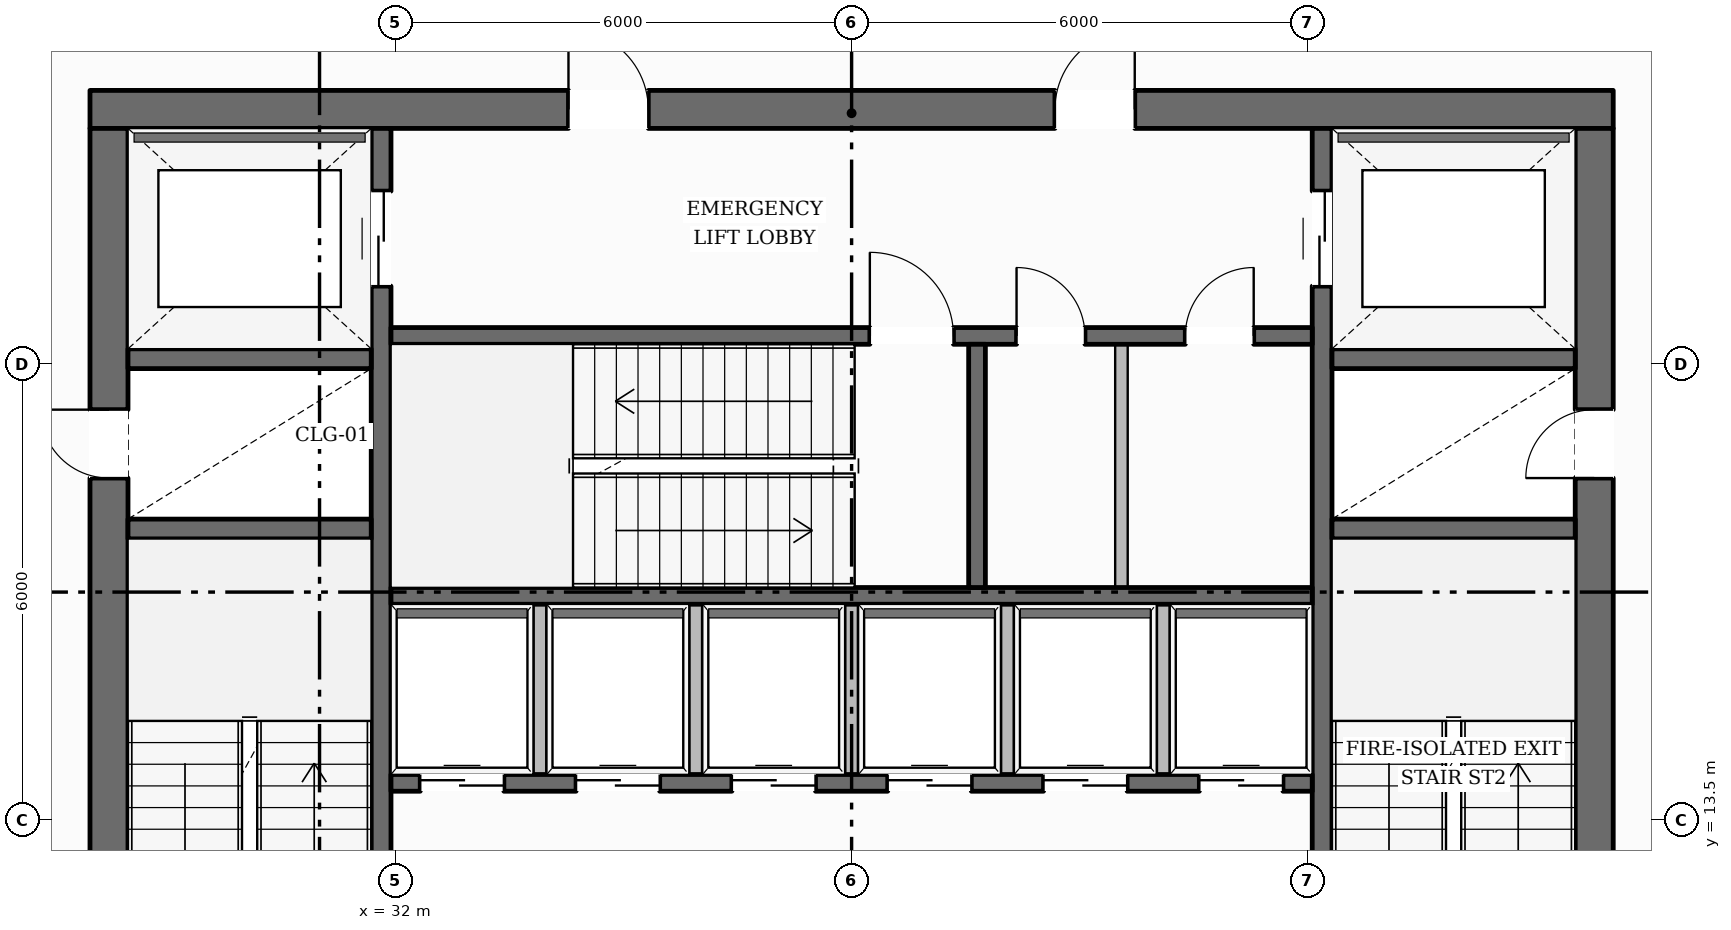
"""IFC4 building model, lengths in metres.
Left out: names, types, materials, properties, quantities, classifications, styles, units other than length and angle.
Written with IfcOpenShell. Run it as: python <this file> out.ifc"""

import sys

from ifc_helpers import new_model, si_unit, direction, frame, frame_2d, origin, place, context, subcontext, project, spatial, rectangle, extrude, element, fill, save


model = new_model("IFC4")
c1 = context("Model", 3, precision=1e-05, world=origin(), true_north=direction((0.0, 1.0)))
c2 = subcontext(c1, "Body", "Model", "MODEL_VIEW")
j1 = project(units=[si_unit("LENGTHUNIT", "METRE"), si_unit("PLANEANGLEUNIT", "RADIAN")], contexts=[c1])
p1 = place(None, origin())
s1 = spatial("IfcSite", under=j1, at=p1, CompositionType="ELEMENT")
p2 = place(p1, origin())
s2 = spatial("IfcBuilding", under=s1, at=p2, CompositionType="ELEMENT")
p3 = place(p2, frame((0.0, 0.0, 80.5)))
s3 = spatial("IfcBuildingStorey", under=s2, at=p3, CompositionType="ELEMENT", Elevation=80.5)
p4 = place(p3, frame((27.98, 22.85, 0.0), z_axis=(0.0, 0.0, 1.0), x_axis=(1.0, 0.0, 0.0)))
e1 = element("IfcWall", 1, at=p4, inside=s3, PredefinedType="SOLIDWALL", context=c2, shape_type="SweptSolid", body=[
    extrude(rectangle(XDim=20.04, YDim=0.5, at=frame_2d((10.02, 0.0))), origin(), (0.0, 0.0, 1.0), 4.75),
])
p5 = place(p4, frame((6.295, 0.0, 0.0)))
e2 = element("IfcOpeningElement", 2, at=p5, cuts=e1, PredefinedType="OPENING", context=c2, shape_type="SweptSolid", body=[
    extrude(rectangle(XDim=1.05, YDim=2.15, at=frame_2d((0.525, 1.075))), frame((0.0, 0.26, 0.0), z_axis=(0.0, -1.0, 0.0), x_axis=(1.0, 0.0, 0.0)), (0.0, 0.0, 1.0), 0.52),
])
p6 = place(p4, frame((12.695, 0.0, 0.0)))
e3 = element("IfcOpeningElement", 3, at=p6, cuts=e1, PredefinedType="OPENING", context=c2, shape_type="SweptSolid", body=[
    extrude(rectangle(XDim=1.05, YDim=2.15, at=frame_2d((0.525, 1.075))), frame((0.0, 0.26, 0.0), z_axis=(0.0, -1.0, 0.0), x_axis=(1.0, 0.0, 0.0)), (0.0, 0.0, 1.0), 0.52),
])
p7 = place(p3, frame((28.23, 9.6, 0.0), z_axis=(0.0, 0.0, 1.0), x_axis=(0.0, 1.0, 0.0)))
e4 = element("IfcWall", 4, at=p7, inside=s3, PredefinedType="SOLIDWALL", context=c2, shape_type="SweptSolid", body=[
    extrude(rectangle(XDim=13.0, YDim=0.5, at=frame_2d((6.5, 0.0))), origin(), (0.0, 0.0, 1.0), 4.75),
])
p8 = place(p7, frame((0.2, 0.0, 0.0)))
e5 = element("IfcOpeningElement", 5, at=p8, cuts=e4, PredefinedType="OPENING", context=c2, shape_type="SweptSolid", body=[
    extrude(rectangle(XDim=1.1, YDim=2.15, at=frame_2d((0.55, 1.075))), frame((0.0, 0.26, 0.0), z_axis=(0.0, -1.0, 0.0), x_axis=(1.0, 0.0, 0.0)), (0.0, 0.0, 1.0), 0.52),
])
p9 = place(p7, frame((8.4, 0.0, 0.0)))
e6 = element("IfcOpeningElement", 6, at=p9, cuts=e4, PredefinedType="OPENING", context=c2, shape_type="SweptSolid", body=[
    extrude(rectangle(XDim=0.9, YDim=2.1, at=frame_2d((0.45, 1.05))), frame((0.0, 0.26, 0.0), z_axis=(0.0, -1.0, 0.0), x_axis=(1.0, 0.0, 0.0)), (0.0, 0.0, 1.0), 0.52),
])
p10 = place(p3, frame((47.77, 9.6, 0.0), z_axis=(0.0, 0.0, 1.0), x_axis=(0.0, 1.0, 0.0)))
e7 = element("IfcWall", 7, at=p10, inside=s3, PredefinedType="SOLIDWALL", context=c2, shape_type="SweptSolid", body=[
    extrude(rectangle(XDim=13.0, YDim=0.5, at=frame_2d((6.5, 0.0))), origin(), (0.0, 0.0, 1.0), 4.75),
])
p11 = place(p10, frame((0.2, 0.0, 0.0)))
e8 = element("IfcOpeningElement", 8, at=p11, cuts=e7, PredefinedType="OPENING", context=c2, shape_type="SweptSolid", body=[
    extrude(rectangle(XDim=1.1, YDim=2.15, at=frame_2d((0.55, 1.075))), frame((0.0, 0.26, 0.0), z_axis=(0.0, -1.0, 0.0), x_axis=(1.0, 0.0, 0.0)), (0.0, 0.0, 1.0), 0.52),
])
p12 = place(p10, frame((8.4, 0.0, 0.0)))
e9 = element("IfcOpeningElement", 9, at=p12, cuts=e7, PredefinedType="OPENING", context=c2, shape_type="SweptSolid", body=[
    extrude(rectangle(XDim=0.9, YDim=2.1, at=frame_2d((0.45, 1.05))), frame((0.0, 0.26, 0.0), z_axis=(0.0, -1.0, 0.0), x_axis=(1.0, 0.0, 0.0)), (0.0, 0.0, 1.0), 0.52),
])
p13 = place(p3, frame((31.81, 9.6, 0.0), z_axis=(0.0, 0.0, 1.0), x_axis=(0.0, 1.0, 0.0)))
e10 = element("IfcWall", 10, at=p13, inside=s3, PredefinedType="SHEAR", context=c2, shape_type="SweptSolid", body=[
    extrude(rectangle(XDim=13.0, YDim=0.26, at=frame_2d((6.5, 0.0))), origin(), (0.0, 0.0, 1.0), 4.75),
])
p14 = place(p13, frame((10.925, 0.0, 0.0)))
e11 = element("IfcOpeningElement", 11, at=p14, cuts=e10, PredefinedType="OPENING", context=c2, shape_type="SweptSolid", body=[
    extrude(rectangle(XDim=1.25, YDim=2.25, at=frame_2d((0.625, 1.125))), frame((0.0, 0.14, 0.0), z_axis=(0.0, -1.0, 0.0), x_axis=(1.0, 0.0, 0.0)), (0.0, 0.0, 1.0), 0.28),
])
p15 = place(p3, frame((44.19, 9.6, 0.0), z_axis=(0.0, 0.0, 1.0), x_axis=(0.0, 1.0, 0.0)))
e12 = element("IfcWall", 12, at=p15, inside=s3, PredefinedType="SHEAR", context=c2, shape_type="SweptSolid", body=[
    extrude(rectangle(XDim=13.0, YDim=0.26, at=frame_2d((6.5, 0.0))), origin(), (0.0, 0.0, 1.0), 4.75),
])
p16 = place(p15, frame((10.925, 0.0, 0.0)))
e13 = element("IfcOpeningElement", 13, at=p16, cuts=e12, PredefinedType="OPENING", context=c2, shape_type="SweptSolid", body=[
    extrude(rectangle(XDim=1.25, YDim=2.25, at=frame_2d((0.625, 1.125))), frame((0.0, 0.14, 0.0), z_axis=(0.0, -1.0, 0.0), x_axis=(1.0, 0.0, 0.0)), (0.0, 0.0, 1.0), 0.28),
])
for number, where, z_axis, x_axis in (
    (14, (28.48, 17.33, 0.0), (0.0, 0.0, 1.0), (1.0, 0.0, 0.0)),
    (15, (28.48, 19.57, 0.0), (0.0, 0.0, 1.0), (1.0, 0.0, 0.0)),
    (16, (44.32, 17.33, 0.0), (0.0, 0.0, 1.0), (1.0, 0.0, 0.0)),
    (17, (44.32, 19.57, 0.0), (0.0, 0.0, 1.0), (1.0, 0.0, 0.0)),
):
    element("IfcWall", number, at=place(p3, frame(where, z_axis=z_axis, x_axis=x_axis)), inside=s3, PredefinedType="SHEAR", context=c2, shape_type="SweptSolid", body=[
        extrude(rectangle(XDim=3.2, YDim=0.26, at=frame_2d((1.6, 0.0))), origin(), (0.0, 0.0, 1.0), 4.75),
    ])
p17 = place(p3, frame((31.94, 19.87, 0.0), z_axis=(0.0, 0.0, 1.0), x_axis=(1.0, 0.0, 0.0)))
e18 = element("IfcWall", 18, at=p17, inside=s3, PredefinedType="SOLIDWALL", context=c2, shape_type="SweptSolid", body=[
    extrude(rectangle(XDim=12.12, YDim=0.22, at=frame_2d((6.06, 0.0))), origin(), (0.0, 0.0, 1.0), 4.75),
])
p18 = place(p17, frame((6.3, 0.0, 0.0)))
e19 = element("IfcOpeningElement", 19, at=p18, cuts=e18, PredefinedType="OPENING", context=c2, shape_type="SweptSolid", body=[
    extrude(rectangle(XDim=1.1, YDim=2.15, at=frame_2d((0.55, 1.075))), frame((0.0, 0.12, 0.0), z_axis=(0.0, -1.0, 0.0), x_axis=(1.0, 0.0, 0.0)), (0.0, 0.0, 1.0), 0.24),
])
p19 = place(p17, frame((8.23, 0.0, 0.0)))
e20 = element("IfcOpeningElement", 20, at=p19, cuts=e18, PredefinedType="OPENING", context=c2, shape_type="SweptSolid", body=[
    extrude(rectangle(XDim=0.9, YDim=2.1, at=frame_2d((0.45, 1.05))), frame((0.0, 0.12, 0.0), z_axis=(0.0, -1.0, 0.0), x_axis=(1.0, 0.0, 0.0)), (0.0, 0.0, 1.0), 0.24),
])
p20 = place(p17, frame((10.45, 0.0, 0.0)))
e21 = element("IfcOpeningElement", 21, at=p20, cuts=e18, PredefinedType="OPENING", context=c2, shape_type="SweptSolid", body=[
    extrude(rectangle(XDim=0.9, YDim=2.1, at=frame_2d((0.45, 1.05))), frame((0.0, 0.12, 0.0), z_axis=(0.0, -1.0, 0.0), x_axis=(1.0, 0.0, 0.0)), (0.0, 0.0, 1.0), 0.24),
])
p21 = place(p3, frame((31.94, 16.45, 0.0), z_axis=(0.0, 0.0, 1.0), x_axis=(1.0, 0.0, 0.0)))
e22 = element("IfcWall", 22, at=p21, inside=s3, PredefinedType="SOLIDWALL", context=c2, shape_type="SweptSolid", body=[
    extrude(rectangle(XDim=12.12, YDim=0.22, at=frame_2d((6.06, 0.0))), origin(), (0.0, 0.0, 1.0), 4.75),
])
p22 = place(p3, frame((39.65, 16.56, 0.0), z_axis=(0.0, 0.0, 1.0), x_axis=(0.0, 1.0, 0.0)))
e23 = element("IfcWall", 23, at=p22, inside=s3, PredefinedType="SOLIDWALL", context=c2, shape_type="SweptSolid", body=[
    extrude(rectangle(XDim=3.2, YDim=0.22, at=frame_2d((1.6, 0.0))), origin(), (0.0, 0.0, 1.0), 4.75),
])
p23 = place(p3, frame((31.94, 13.99, 0.0), z_axis=(0.0, 0.0, 1.0), x_axis=(1.0, 0.0, 0.0)))
e24 = element("IfcWall", 24, at=p23, inside=s3, PredefinedType="SOLIDWALL", context=c2, shape_type="SweptSolid", body=[
    extrude(rectangle(XDim=12.12, YDim=0.22, at=frame_2d((6.06, 0.0))), origin(), (0.0, 0.0, 1.0), 4.75),
])
p24 = place(p23, frame((0.385, 0.0, 0.0)))
e25 = element("IfcOpeningElement", 25, at=p24, cuts=e24, PredefinedType="OPENING", context=c2, shape_type="SweptSolid", body=[
    extrude(rectangle(XDim=1.1, YDim=2.2, at=frame_2d((0.55, 1.1))), frame((0.0, 0.12, 0.0), z_axis=(0.0, -1.0, 0.0), x_axis=(1.0, 0.0, 0.0)), (0.0, 0.0, 1.0), 0.24),
])
p25 = place(p23, frame((2.435, 0.0, 0.0)))
e26 = element("IfcOpeningElement", 26, at=p25, cuts=e24, PredefinedType="OPENING", context=c2, shape_type="SweptSolid", body=[
    extrude(rectangle(XDim=1.1, YDim=2.2, at=frame_2d((0.55, 1.1))), frame((0.0, 0.12, 0.0), z_axis=(0.0, -1.0, 0.0), x_axis=(1.0, 0.0, 0.0)), (0.0, 0.0, 1.0), 0.24),
])
p26 = place(p23, frame((4.485, 0.0, 0.0)))
e27 = element("IfcOpeningElement", 27, at=p26, cuts=e24, PredefinedType="OPENING", context=c2, shape_type="SweptSolid", body=[
    extrude(rectangle(XDim=1.1, YDim=2.2, at=frame_2d((0.55, 1.1))), frame((0.0, 0.12, 0.0), z_axis=(0.0, -1.0, 0.0), x_axis=(1.0, 0.0, 0.0)), (0.0, 0.0, 1.0), 0.24),
])
p27 = place(p23, frame((6.535, 0.0, 0.0)))
e28 = element("IfcOpeningElement", 28, at=p27, cuts=e24, PredefinedType="OPENING", context=c2, shape_type="SweptSolid", body=[
    extrude(rectangle(XDim=1.1, YDim=2.2, at=frame_2d((0.55, 1.1))), frame((0.0, 0.12, 0.0), z_axis=(0.0, -1.0, 0.0), x_axis=(1.0, 0.0, 0.0)), (0.0, 0.0, 1.0), 0.24),
])
p28 = place(p23, frame((8.585, 0.0, 0.0)))
e29 = element("IfcOpeningElement", 29, at=p28, cuts=e24, PredefinedType="OPENING", context=c2, shape_type="SweptSolid", body=[
    extrude(rectangle(XDim=1.1, YDim=2.2, at=frame_2d((0.55, 1.1))), frame((0.0, 0.12, 0.0), z_axis=(0.0, -1.0, 0.0), x_axis=(1.0, 0.0, 0.0)), (0.0, 0.0, 1.0), 0.24),
])
p29 = place(p23, frame((10.635, 0.0, 0.0)))
e30 = element("IfcOpeningElement", 30, at=p29, cuts=e24, PredefinedType="OPENING", context=c2, shape_type="SweptSolid", body=[
    extrude(rectangle(XDim=1.1, YDim=2.2, at=frame_2d((0.55, 1.1))), frame((0.0, 0.12, 0.0), z_axis=(0.0, -1.0, 0.0), x_axis=(1.0, 0.0, 0.0)), (0.0, 0.0, 1.0), 0.24),
])
p30 = place(p3, frame((13.724, 13.51, 0.0), z_axis=(0.0, 0.0, 1.0), x_axis=(0.500779221595, 0.865575052331, 0.0)))
e31 = element("IfcWall", 31, at=p30, inside=s3, PredefinedType="STANDARD", context=c2, shape_type="SweptSolid", body=[
    extrude(rectangle(XDim=35.421, YDim=0.38, at=frame_2d((17.71, 0.0))), origin(), (0.0, 0.0, 1.0), 4.209),
])
p31 = place(p30, frame((31.073, 0.0, 0.65)))
e32 = element("IfcOpeningElement", 32, at=p31, cuts=e31, PredefinedType="OPENING", context=c2, shape_type="SweptSolid", body=[
    extrude(rectangle(XDim=2.0, YDim=2.25, at=frame_2d((1.0, 1.125))), frame((0.0, 0.2, 0.0), z_axis=(0.0, -1.0, 0.0), x_axis=(1.0, 0.0, 0.0)), (0.0, 0.0, 1.0), 0.4),
])
p32 = place(p30, frame((2.348, 0.0, 0.65)))
e33 = element("IfcOpeningElement", 33, at=p32, cuts=e31, PredefinedType="OPENING", context=c2, shape_type="SweptSolid", body=[
    extrude(rectangle(XDim=2.0, YDim=2.25, at=frame_2d((1.0, 1.125))), frame((0.0, 0.2, 0.0), z_axis=(0.0, -1.0, 0.0), x_axis=(1.0, 0.0, 0.0)), (0.0, 0.0, 1.0), 0.4),
])
p33 = place(p3, frame((44.389, 44.257, 0.0), z_axis=(0.0, 0.0, 1.0), x_axis=(0.495210354805, -0.868773102999, 0.0)))
e34 = element("IfcWall", 34, at=p33, inside=s3, PredefinedType="STANDARD", context=c2, shape_type="SweptSolid", body=[
    extrude(rectangle(XDim=35.035, YDim=0.38, at=frame_2d((17.518, 0.0))), origin(), (0.0, 0.0, 1.0), 4.209),
])
p34 = place(p33, frame((30.72, 0.0, 0.65)))
e35 = element("IfcOpeningElement", 35, at=p34, cuts=e34, PredefinedType="OPENING", context=c2, shape_type="SweptSolid", body=[
    extrude(rectangle(XDim=2.0, YDim=2.25, at=frame_2d((1.0, 1.125))), frame((0.0, 0.2, 0.0), z_axis=(0.0, -1.0, 0.0), x_axis=(1.0, 0.0, 0.0)), (0.0, 0.0, 1.0), 0.4),
])
p35 = place(p33, frame((2.321, 0.0, 0.65)))
e36 = element("IfcOpeningElement", 36, at=p35, cuts=e34, PredefinedType="OPENING", context=c2, shape_type="SweptSolid", body=[
    extrude(rectangle(XDim=2.0, YDim=2.25, at=frame_2d((1.0, 1.125))), frame((0.0, 0.2, 0.0), z_axis=(0.0, -1.0, 0.0), x_axis=(1.0, 0.0, 0.0)), (0.0, 0.0, 1.0), 0.4),
])
for number, where, z_axis, x_axis in (
    (37, (33.9, 14.1, 0.0), (0.0, 0.0, 1.0), (0.0, 1.0, 0.0)),
    (38, (35.95, 14.1, 0.0), (0.0, 0.0, 1.0), (0.0, 1.0, 0.0)),
    (39, (38.0, 14.1, 0.0), (0.0, 0.0, 1.0), (0.0, 1.0, 0.0)),
    (40, (40.05, 14.1, 0.0), (0.0, 0.0, 1.0), (0.0, 1.0, 0.0)),
    (41, (42.1, 14.1, 0.0), (0.0, 0.0, 1.0), (0.0, 1.0, 0.0)),
):
    element("IfcWall", number, at=place(p3, frame(where, z_axis=z_axis, x_axis=x_axis)), inside=s3, PredefinedType="PARTITIONING", context=c2, shape_type="SweptSolid", body=[
        extrude(rectangle(XDim=2.24, YDim=0.165, at=frame_2d((1.12, 0.0))), origin(), (0.0, 0.0, 1.0), 4.75),
    ])
p36 = place(p3, frame((41.55, 16.56, 0.0), z_axis=(0.0, 0.0, 1.0), x_axis=(0.0, 1.0, 0.0)))
e42 = element("IfcWall", 42, at=p36, inside=s3, PredefinedType="PARTITIONING", context=c2, shape_type="SweptSolid", body=[
    extrude(rectangle(XDim=3.2, YDim=0.165, at=frame_2d((1.6, 0.0))), origin(), (0.0, 0.0, 1.0), 4.75),
])
p37 = place(p18, origin())
e43 = element("IfcDoor", 43, at=p37, inside=s3, OperationType="SINGLE_SWING_LEFT", PredefinedType="DOOR", context=c2, shape_type="SweptSolid", body=[
    extrude(rectangle(XDim=1.1, YDim=2.15, at=frame_2d((0.55, 1.075))), frame((0.0, 0.025, 0.0), z_axis=(0.0, -1.0, 0.0), x_axis=(1.0, 0.0, 0.0)), (0.0, 0.0, 1.0), 0.05),
])
fill(e19, e43)
p38 = place(p9, origin())
e44 = element("IfcDoor", 44, at=p38, inside=s3, OperationType="SINGLE_SWING_RIGHT", PredefinedType="DOOR", context=c2, shape_type="SweptSolid", body=[
    extrude(rectangle(XDim=0.9, YDim=2.1, at=frame_2d((0.45, 1.05))), frame((0.0, 0.025, 0.0), z_axis=(0.0, -1.0, 0.0), x_axis=(1.0, 0.0, 0.0)), (0.0, 0.0, 1.0), 0.05),
])
fill(e6, e44)
p39 = place(p12, origin())
e45 = element("IfcDoor", 45, at=p39, inside=s3, OperationType="SINGLE_SWING_LEFT", PredefinedType="DOOR", context=c2, shape_type="SweptSolid", body=[
    extrude(rectangle(XDim=0.9, YDim=2.1, at=frame_2d((0.45, 1.05))), frame((0.0, 0.025, 0.0), z_axis=(0.0, -1.0, 0.0), x_axis=(1.0, 0.0, 0.0)), (0.0, 0.0, 1.0), 0.05),
])
fill(e9, e45)
p40 = place(p5, origin())
e46 = element("IfcDoor", 46, at=p40, inside=s3, OperationType="SINGLE_SWING_LEFT", PredefinedType="DOOR", context=c2, shape_type="SweptSolid", body=[
    extrude(rectangle(XDim=1.05, YDim=2.15, at=frame_2d((0.525, 1.075))), frame((0.0, 0.025, 0.0), z_axis=(0.0, -1.0, 0.0), x_axis=(1.0, 0.0, 0.0)), (0.0, 0.0, 1.0), 0.05),
])
fill(e2, e46)
p41 = place(p6, origin())
e47 = element("IfcDoor", 47, at=p41, inside=s3, OperationType="SINGLE_SWING_RIGHT", PredefinedType="DOOR", context=c2, shape_type="SweptSolid", body=[
    extrude(rectangle(XDim=1.05, YDim=2.15, at=frame_2d((0.525, 1.075))), frame((0.0, 0.025, 0.0), z_axis=(0.0, -1.0, 0.0), x_axis=(1.0, 0.0, 0.0)), (0.0, 0.0, 1.0), 0.05),
])
fill(e3, e47)
p42 = place(p14, origin())
e48 = element("IfcDoor", 48, at=p42, inside=s3, OperationType="DOUBLE_DOOR_SLIDING", PredefinedType="DOOR", context=c2, shape_type="SweptSolid", body=[
    extrude(rectangle(XDim=1.25, YDim=2.25, at=frame_2d((0.625, 1.125))), frame((0.0, 0.025, 0.0), z_axis=(0.0, -1.0, 0.0), x_axis=(1.0, 0.0, 0.0)), (0.0, 0.0, 1.0), 0.05),
])
fill(e11, e48)
p43 = place(p16, origin())
e49 = element("IfcDoor", 49, at=p43, inside=s3, OperationType="DOUBLE_DOOR_SLIDING", PredefinedType="DOOR", context=c2, shape_type="SweptSolid", body=[
    extrude(rectangle(XDim=1.25, YDim=2.25, at=frame_2d((0.625, 1.125))), frame((0.0, 0.025, 0.0), z_axis=(0.0, -1.0, 0.0), x_axis=(1.0, 0.0, 0.0)), (0.0, 0.0, 1.0), 0.05),
])
fill(e13, e49)
p44 = place(p24, origin())
e50 = element("IfcDoor", 50, at=p44, inside=s3, OperationType="DOUBLE_DOOR_SLIDING", PredefinedType="DOOR", context=c2, shape_type="SweptSolid", body=[
    extrude(rectangle(XDim=1.1, YDim=2.2, at=frame_2d((0.55, 1.1))), frame((0.0, 0.025, 0.0), z_axis=(0.0, -1.0, 0.0), x_axis=(1.0, 0.0, 0.0)), (0.0, 0.0, 1.0), 0.05),
])
fill(e25, e50)
p45 = place(p25, origin())
e51 = element("IfcDoor", 51, at=p45, inside=s3, OperationType="DOUBLE_DOOR_SLIDING", PredefinedType="DOOR", context=c2, shape_type="SweptSolid", body=[
    extrude(rectangle(XDim=1.1, YDim=2.2, at=frame_2d((0.55, 1.1))), frame((0.0, 0.025, 0.0), z_axis=(0.0, -1.0, 0.0), x_axis=(1.0, 0.0, 0.0)), (0.0, 0.0, 1.0), 0.05),
])
fill(e26, e51)
p46 = place(p26, origin())
e52 = element("IfcDoor", 52, at=p46, inside=s3, OperationType="DOUBLE_DOOR_SLIDING", PredefinedType="DOOR", context=c2, shape_type="SweptSolid", body=[
    extrude(rectangle(XDim=1.1, YDim=2.2, at=frame_2d((0.55, 1.1))), frame((0.0, 0.025, 0.0), z_axis=(0.0, -1.0, 0.0), x_axis=(1.0, 0.0, 0.0)), (0.0, 0.0, 1.0), 0.05),
])
fill(e27, e52)
p47 = place(p27, origin())
e53 = element("IfcDoor", 53, at=p47, inside=s3, OperationType="DOUBLE_DOOR_SLIDING", PredefinedType="DOOR", context=c2, shape_type="SweptSolid", body=[
    extrude(rectangle(XDim=1.1, YDim=2.2, at=frame_2d((0.55, 1.1))), frame((0.0, 0.025, 0.0), z_axis=(0.0, -1.0, 0.0), x_axis=(1.0, 0.0, 0.0)), (0.0, 0.0, 1.0), 0.05),
])
fill(e28, e53)
p48 = place(p28, origin())
e54 = element("IfcDoor", 54, at=p48, inside=s3, OperationType="DOUBLE_DOOR_SLIDING", PredefinedType="DOOR", context=c2, shape_type="SweptSolid", body=[
    extrude(rectangle(XDim=1.1, YDim=2.2, at=frame_2d((0.55, 1.1))), frame((0.0, 0.025, 0.0), z_axis=(0.0, -1.0, 0.0), x_axis=(1.0, 0.0, 0.0)), (0.0, 0.0, 1.0), 0.05),
])
fill(e29, e54)
p49 = place(p29, origin())
e55 = element("IfcDoor", 55, at=p49, inside=s3, OperationType="DOUBLE_DOOR_SLIDING", PredefinedType="DOOR", context=c2, shape_type="SweptSolid", body=[
    extrude(rectangle(XDim=1.1, YDim=2.2, at=frame_2d((0.55, 1.1))), frame((0.0, 0.025, 0.0), z_axis=(0.0, -1.0, 0.0), x_axis=(1.0, 0.0, 0.0)), (0.0, 0.0, 1.0), 0.05),
])
fill(e30, e55)
p50 = place(p19, origin())
e56 = element("IfcDoor", 56, at=p50, inside=s3, OperationType="SINGLE_SWING_LEFT", PredefinedType="DOOR", context=c2, shape_type="SweptSolid", body=[
    extrude(rectangle(XDim=0.9, YDim=2.1, at=frame_2d((0.45, 1.05))), frame((0.0, 0.025, 0.0), z_axis=(0.0, -1.0, 0.0), x_axis=(1.0, 0.0, 0.0)), (0.0, 0.0, 1.0), 0.05),
])
fill(e20, e56)
p51 = place(p20, origin())
e57 = element("IfcDoor", 57, at=p51, inside=s3, OperationType="SINGLE_SWING_RIGHT", PredefinedType="DOOR", context=c2, shape_type="SweptSolid", body=[
    extrude(rectangle(XDim=0.9, YDim=2.1, at=frame_2d((0.45, 1.05))), frame((0.0, 0.025, 0.0), z_axis=(0.0, -1.0, 0.0), x_axis=(1.0, 0.0, 0.0)), (0.0, 0.0, 1.0), 0.05),
])
fill(e21, e57)
save(model, sys.argv[1])
